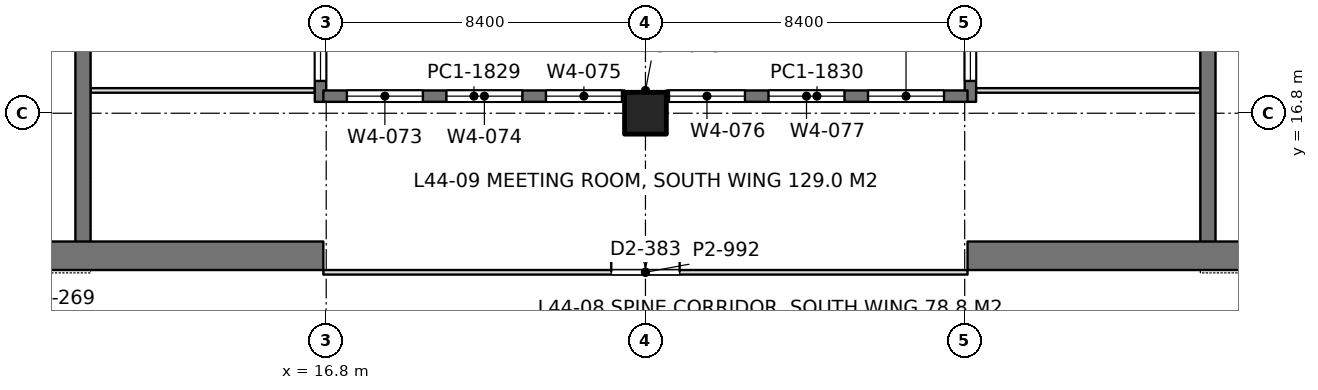
"""IFC4 building model, lengths in metres.
Left out: names, types, materials, properties, quantities, classifications, styles, units other than length and angle.
Written with IfcOpenShell. Run it as: python <this file> out.ifc"""

import sys

from ifc_helpers import new_model, si_unit, direction, frame, frame_2d, origin, origin_2d, place, context, subcontext, project, spatial, rectangle, extrude, element, fill, save


model = new_model("IFC4")
c1 = context("Model", 3, precision=1e-05, world=origin(), true_north=direction((0.0, 1.0)))
c2 = subcontext(c1, "Body", "Model", "MODEL_VIEW")
j1 = project(units=[si_unit("LENGTHUNIT", "METRE"), si_unit("PLANEANGLEUNIT", "RADIAN")], contexts=[c1])
p1 = place(None, origin())
s1 = spatial("IfcSite", under=j1, at=p1, CompositionType="ELEMENT")
p2 = place(p1, origin())
s2 = spatial("IfcBuilding", under=s1, at=p2, CompositionType="ELEMENT")
p3 = place(p2, frame((0.0, 0.0, 194.4)))
s3 = spatial("IfcBuildingStorey", under=s2, at=p3, CompositionType="ELEMENT", Elevation=194.4)
p4 = place(p3, frame((25.2, 16.8, 0.0), z_axis=(0.0, 0.0, 1.0), x_axis=(1.0, 0.0, 0.0)))
e1 = element("IfcColumn", 1, at=p4, inside=s3, PredefinedType="COLUMN", context=c2, shape_type="SweptSolid", body=[
    extrude(rectangle(XDim=1.1, YDim=1.1, at=origin_2d()), origin(), (0.0, 0.0, 1.0), 4.2),
])
p5 = place(p3, frame((-1.125, 13.05, 0.0), z_axis=(0.0, 0.0, 1.0), x_axis=(1.0, 0.0, 0.0)))
e2 = element("IfcWall", 2, at=p5, inside=s3, PredefinedType="SHEAR", context=c2, shape_type="SweptSolid", body=[
    extrude(rectangle(XDim=17.85, YDim=0.75, at=frame_2d((8.925, 0.0))), origin(), (0.0, 0.0, 1.0), 4.2),
])
p6 = place(p5, frame((8.875, 0.0, 0.0)))
e3 = element("IfcOpeningElement", 3, at=p6, cuts=e2, PredefinedType="OPENING", context=c2, shape_type="SweptSolid", body=[
    extrude(rectangle(XDim=1.8, YDim=2.4, at=frame_2d((0.9, 1.2))), frame((0.0, 0.385, 0.0), z_axis=(0.0, -1.0, 0.0), x_axis=(1.0, 0.0, 0.0)), (0.0, 0.0, 1.0), 0.77),
])
p7 = place(p3, frame((10.4, 13.05, 0.0), z_axis=(0.0, 0.0, 1.0), x_axis=(0.0, 1.0, 0.0)))
e4 = element("IfcWall", 4, at=p7, inside=s3, PredefinedType="SHEAR", context=c2, shape_type="SweptSolid", body=[
    extrude(rectangle(XDim=24.3, YDim=0.4, at=frame_2d((12.15, 0.0))), origin(), (0.0, 0.0, 1.0), 4.2),
])
p8 = place(p7, frame((15.75, 0.0, 0.0)))
e5 = element("IfcOpeningElement", 5, at=p8, cuts=e4, PredefinedType="OPENING", context=c2, shape_type="SweptSolid", body=[
    extrude(rectangle(XDim=1.1, YDim=2.2, at=frame_2d((0.55, 1.1))), frame((0.0, 0.21, 0.0), z_axis=(0.0, -1.0, 0.0), x_axis=(1.0, 0.0, 0.0)), (0.0, 0.0, 1.0), 0.42),
])
p9 = place(p7, frame((18.6, 0.0, 0.0)))
e6 = element("IfcOpeningElement", 6, at=p9, cuts=e4, PredefinedType="OPENING", context=c2, shape_type="SweptSolid", body=[
    extrude(rectangle(XDim=1.1, YDim=2.2, at=frame_2d((0.55, 1.1))), frame((0.0, 0.21, 0.0), z_axis=(0.0, -1.0, 0.0), x_axis=(1.0, 0.0, 0.0)), (0.0, 0.0, 1.0), 0.42),
])
p10 = place(p7, frame((21.45, 0.0, 0.0)))
e7 = element("IfcOpeningElement", 7, at=p10, cuts=e4, PredefinedType="OPENING", context=c2, shape_type="SweptSolid", body=[
    extrude(rectangle(XDim=1.1, YDim=2.2, at=frame_2d((0.55, 1.1))), frame((0.0, 0.21, 0.0), z_axis=(0.0, -1.0, 0.0), x_axis=(1.0, 0.0, 0.0)), (0.0, 0.0, 1.0), 0.42),
])
p11 = place(p7, frame((8.65, 0.0, 0.0)))
e8 = element("IfcOpeningElement", 8, at=p11, cuts=e4, PredefinedType="OPENING", context=c2, shape_type="SweptSolid", body=[
    extrude(rectangle(XDim=1.8, YDim=2.4, at=frame_2d((0.9, 1.2))), frame((0.0, 0.21, 0.0), z_axis=(0.0, -1.0, 0.0), x_axis=(1.0, 0.0, 0.0)), (0.0, 0.0, 1.0), 0.42),
])
p12 = place(p3, frame((33.675, 13.05, 0.0), z_axis=(0.0, 0.0, 1.0), x_axis=(1.0, 0.0, 0.0)))
e9 = element("IfcWall", 9, at=p12, inside=s3, PredefinedType="SHEAR", context=c2, shape_type="SweptSolid", body=[
    extrude(rectangle(XDim=17.85, YDim=0.75, at=frame_2d((8.925, 0.0))), origin(), (0.0, 0.0, 1.0), 4.2),
])
p13 = place(p12, frame((7.175, 0.0, 0.0)))
e10 = element("IfcOpeningElement", 10, at=p13, cuts=e9, PredefinedType="OPENING", context=c2, shape_type="SweptSolid", body=[
    extrude(rectangle(XDim=1.8, YDim=2.4, at=frame_2d((0.9, 1.2))), frame((0.0, 0.385, 0.0), z_axis=(0.0, -1.0, 0.0), x_axis=(1.0, 0.0, 0.0)), (0.0, 0.0, 1.0), 0.77),
])
p14 = place(p3, frame((40.0, 13.05, 0.0), z_axis=(0.0, 0.0, 1.0), x_axis=(0.0, 1.0, 0.0)))
e11 = element("IfcWall", 11, at=p14, inside=s3, PredefinedType="SHEAR", context=c2, shape_type="SweptSolid", body=[
    extrude(rectangle(XDim=24.3, YDim=0.4, at=frame_2d((12.15, 0.0))), origin(), (0.0, 0.0, 1.0), 4.2),
])
p15 = place(p14, frame((15.75, 0.0, 0.0)))
e12 = element("IfcOpeningElement", 12, at=p15, cuts=e11, PredefinedType="OPENING", context=c2, shape_type="SweptSolid", body=[
    extrude(rectangle(XDim=1.1, YDim=2.2, at=frame_2d((0.55, 1.1))), frame((0.0, 0.21, 0.0), z_axis=(0.0, -1.0, 0.0), x_axis=(1.0, 0.0, 0.0)), (0.0, 0.0, 1.0), 0.42),
])
p16 = place(p14, frame((18.6, 0.0, 0.0)))
e13 = element("IfcOpeningElement", 13, at=p16, cuts=e11, PredefinedType="OPENING", context=c2, shape_type="SweptSolid", body=[
    extrude(rectangle(XDim=1.1, YDim=2.2, at=frame_2d((0.55, 1.1))), frame((0.0, 0.21, 0.0), z_axis=(0.0, -1.0, 0.0), x_axis=(1.0, 0.0, 0.0)), (0.0, 0.0, 1.0), 0.42),
])
p17 = place(p14, frame((21.45, 0.0, 0.0)))
e14 = element("IfcOpeningElement", 14, at=p17, cuts=e11, PredefinedType="OPENING", context=c2, shape_type="SweptSolid", body=[
    extrude(rectangle(XDim=1.1, YDim=2.2, at=frame_2d((0.55, 1.1))), frame((0.0, 0.21, 0.0), z_axis=(0.0, -1.0, 0.0), x_axis=(1.0, 0.0, 0.0)), (0.0, 0.0, 1.0), 0.42),
])
p18 = place(p14, frame((8.65, 0.0, 0.0)))
e15 = element("IfcOpeningElement", 15, at=p18, cuts=e11, PredefinedType="OPENING", context=c2, shape_type="SweptSolid", body=[
    extrude(rectangle(XDim=1.8, YDim=2.4, at=frame_2d((0.9, 1.2))), frame((0.0, 0.21, 0.0), z_axis=(0.0, -1.0, 0.0), x_axis=(1.0, 0.0, 0.0)), (0.0, 0.0, 1.0), 0.42),
])
p19 = place(p3, frame((16.65, 17.1, 0.0), z_axis=(0.0, 0.0, 1.0), x_axis=(0.0, 1.0, 0.0)))
e16 = element("IfcWall", 16, at=p19, inside=s3, PredefinedType="SOLIDWALL", context=c2, shape_type="SweptSolid", body=[
    extrude(rectangle(XDim=10.7, YDim=0.3, at=frame_2d((5.35, 0.0))), origin(), (0.0, 0.0, 1.0), 4.05),
])
p20 = place(p19, frame((0.55, 0.0, 0.9)))
e17 = element("IfcOpeningElement", 17, at=p20, cuts=e16, PredefinedType="OPENING", context=c2, shape_type="SweptSolid", body=[
    extrude(rectangle(XDim=2.0, YDim=1.9, at=frame_2d((1.0, 0.95))), frame((0.0, 0.16, 0.0), z_axis=(0.0, -1.0, 0.0), x_axis=(1.0, 0.0, 0.0)), (0.0, 0.0, 1.0), 0.32),
])
p21 = place(p19, frame((2.9, 0.0, 0.9)))
e18 = element("IfcOpeningElement", 18, at=p21, cuts=e16, PredefinedType="OPENING", context=c2, shape_type="SweptSolid", body=[
    extrude(rectangle(XDim=2.0, YDim=1.9, at=frame_2d((1.0, 0.95))), frame((0.0, 0.16, 0.0), z_axis=(0.0, -1.0, 0.0), x_axis=(1.0, 0.0, 0.0)), (0.0, 0.0, 1.0), 0.32),
])
p22 = place(p19, frame((7.675, 0.0, 0.9)))
e19 = element("IfcOpeningElement", 19, at=p22, cuts=e16, PredefinedType="OPENING", context=c2, shape_type="SweptSolid", body=[
    extrude(rectangle(XDim=2.0, YDim=1.9, at=frame_2d((1.0, 0.95))), frame((0.0, 0.16, 0.0), z_axis=(0.0, -1.0, 0.0), x_axis=(1.0, 0.0, 0.0)), (0.0, 0.0, 1.0), 0.32),
])
p23 = place(p3, frame((33.75, 17.1, 0.0), z_axis=(0.0, 0.0, 1.0), x_axis=(0.0, 1.0, 0.0)))
e20 = element("IfcWall", 20, at=p23, inside=s3, PredefinedType="SOLIDWALL", context=c2, shape_type="SweptSolid", body=[
    extrude(rectangle(XDim=10.7, YDim=0.3, at=frame_2d((5.35, 0.0))), origin(), (0.0, 0.0, 1.0), 4.05),
])
p24 = place(p23, frame((0.55, 0.0, 0.9)))
e21 = element("IfcOpeningElement", 21, at=p24, cuts=e20, PredefinedType="OPENING", context=c2, shape_type="SweptSolid", body=[
    extrude(rectangle(XDim=2.0, YDim=1.9, at=frame_2d((1.0, 0.95))), frame((0.0, 0.16, 0.0), z_axis=(0.0, -1.0, 0.0), x_axis=(1.0, 0.0, 0.0)), (0.0, 0.0, 1.0), 0.32),
])
p25 = place(p23, frame((2.9, 0.0, 0.9)))
e22 = element("IfcOpeningElement", 22, at=p25, cuts=e20, PredefinedType="OPENING", context=c2, shape_type="SweptSolid", body=[
    extrude(rectangle(XDim=2.0, YDim=1.9, at=frame_2d((1.0, 0.95))), frame((0.0, 0.16, 0.0), z_axis=(0.0, -1.0, 0.0), x_axis=(1.0, 0.0, 0.0)), (0.0, 0.0, 1.0), 0.32),
])
p26 = place(p23, frame((7.675, 0.0, 0.9)))
e23 = element("IfcOpeningElement", 23, at=p26, cuts=e20, PredefinedType="OPENING", context=c2, shape_type="SweptSolid", body=[
    extrude(rectangle(XDim=2.0, YDim=1.9, at=frame_2d((1.0, 0.95))), frame((0.0, 0.16, 0.0), z_axis=(0.0, -1.0, 0.0), x_axis=(1.0, 0.0, 0.0)), (0.0, 0.0, 1.0), 0.32),
])
p27 = place(p3, frame((16.725, 17.25, 0.0), z_axis=(0.0, 0.0, 1.0), x_axis=(1.0, 0.0, 0.0)))
e24 = element("IfcWall", 24, at=p27, inside=s3, PredefinedType="SOLIDWALL", context=c2, shape_type="SweptSolid", body=[
    extrude(rectangle(XDim=7.925, YDim=0.3, at=frame_2d((3.962, 0.0))), origin(), (0.0, 0.0, 1.0), 4.05),
])
p28 = place(p27, frame((0.619, 0.0, 0.9)))
e25 = element("IfcOpeningElement", 25, at=p28, cuts=e24, PredefinedType="OPENING", context=c2, shape_type="SweptSolid", body=[
    extrude(rectangle(XDim=2.0, YDim=1.9, at=frame_2d((1.0, 0.95))), frame((0.0, 0.16, 0.0), z_axis=(0.0, -1.0, 0.0), x_axis=(1.0, 0.0, 0.0)), (0.0, 0.0, 1.0), 0.32),
])
p29 = place(p27, frame((3.238, 0.0, 0.9)))
e26 = element("IfcOpeningElement", 26, at=p29, cuts=e24, PredefinedType="OPENING", context=c2, shape_type="SweptSolid", body=[
    extrude(rectangle(XDim=2.0, YDim=1.9, at=frame_2d((1.0, 0.95))), frame((0.0, 0.16, 0.0), z_axis=(0.0, -1.0, 0.0), x_axis=(1.0, 0.0, 0.0)), (0.0, 0.0, 1.0), 0.32),
])
p30 = place(p27, frame((5.856, 0.0, 0.9)))
e27 = element("IfcOpeningElement", 27, at=p30, cuts=e24, PredefinedType="OPENING", context=c2, shape_type="SweptSolid", body=[
    extrude(rectangle(XDim=2.0, YDim=1.9, at=frame_2d((1.0, 0.95))), frame((0.0, 0.16, 0.0), z_axis=(0.0, -1.0, 0.0), x_axis=(1.0, 0.0, 0.0)), (0.0, 0.0, 1.0), 0.32),
])
p31 = place(p3, frame((25.75, 17.25, 0.0), z_axis=(0.0, 0.0, 1.0), x_axis=(1.0, 0.0, 0.0)))
e28 = element("IfcWall", 28, at=p31, inside=s3, PredefinedType="SOLIDWALL", context=c2, shape_type="SweptSolid", body=[
    extrude(rectangle(XDim=7.925, YDim=0.3, at=frame_2d((3.962, 0.0))), origin(), (0.0, 0.0, 1.0), 4.05),
])
p32 = place(p31, frame((0.069, 0.0, 0.9)))
e29 = element("IfcOpeningElement", 29, at=p32, cuts=e28, PredefinedType="OPENING", context=c2, shape_type="SweptSolid", body=[
    extrude(rectangle(XDim=2.0, YDim=1.9, at=frame_2d((1.0, 0.95))), frame((0.0, 0.16, 0.0), z_axis=(0.0, -1.0, 0.0), x_axis=(1.0, 0.0, 0.0)), (0.0, 0.0, 1.0), 0.32),
])
p33 = place(p31, frame((2.688, 0.0, 0.9)))
e30 = element("IfcOpeningElement", 30, at=p33, cuts=e28, PredefinedType="OPENING", context=c2, shape_type="SweptSolid", body=[
    extrude(rectangle(XDim=2.0, YDim=1.9, at=frame_2d((1.0, 0.95))), frame((0.0, 0.16, 0.0), z_axis=(0.0, -1.0, 0.0), x_axis=(1.0, 0.0, 0.0)), (0.0, 0.0, 1.0), 0.32),
])
p34 = place(p31, frame((5.306, 0.0, 0.9)))
e31 = element("IfcOpeningElement", 31, at=p34, cuts=e28, PredefinedType="OPENING", context=c2, shape_type="SweptSolid", body=[
    extrude(rectangle(XDim=2.0, YDim=1.9, at=frame_2d((1.0, 0.95))), frame((0.0, 0.16, 0.0), z_axis=(0.0, -1.0, 0.0), x_axis=(1.0, 0.0, 0.0)), (0.0, 0.0, 1.0), 0.32),
])
for number, where, z_axis, x_axis in (
    (32, (10.598, 17.4, 0.0), (0.0, 0.0, 1.0), (1.0, 0.0, 0.0)),
    (33, (33.898, 17.4, 0.0), (0.0, 0.0, 1.0), (1.0, 0.0, 0.0)),
):
    element("IfcWall", number, at=place(p3, frame(where, z_axis=z_axis, x_axis=x_axis)), inside=s3, PredefinedType="PARTITIONING", context=c2, shape_type="SweptSolid", body=[
        extrude(rectangle(XDim=5.904, YDim=0.12, at=frame_2d((2.952, 0.0))), origin(), (0.0, 0.0, 1.0), 3.55),
    ])
p35 = place(p3, frame((16.725, 12.615, 0.0), z_axis=(0.0, 0.0, 1.0), x_axis=(1.0, 0.0, 0.0)))
e34 = element("IfcWall", 34, at=p35, inside=s3, PredefinedType="PARTITIONING", context=c2, shape_type="SweptSolid", body=[
    extrude(rectangle(XDim=16.95, YDim=0.12, at=frame_2d((8.475, 0.0))), origin(), (0.0, 0.0, 1.0), 3.55),
])
p36 = place(p35, frame((7.575, 0.0, 0.0)))
e35 = element("IfcOpeningElement", 35, at=p36, cuts=e34, PredefinedType="OPENING", context=c2, shape_type="SweptSolid", body=[
    extrude(rectangle(XDim=1.8, YDim=2.2, at=frame_2d((0.9, 1.1))), frame((0.0, 0.07, 0.0), z_axis=(0.0, -1.0, 0.0), x_axis=(1.0, 0.0, 0.0)), (0.0, 0.0, 1.0), 0.14),
])
p37 = place(p20, origin())
e36 = element("IfcWindow", 36, at=p37, inside=s3, PartitioningType="SINGLE_PANEL", PredefinedType="WINDOW", context=c2, shape_type="SweptSolid", body=[
    extrude(rectangle(XDim=2.0, YDim=1.9, at=frame_2d((1.0, 0.95))), frame((0.0, 0.03, 0.0), z_axis=(0.0, -1.0, 0.0), x_axis=(1.0, 0.0, 0.0)), (0.0, 0.0, 1.0), 0.06),
])
fill(e17, e36)
p38 = place(p24, origin())
e37 = element("IfcWindow", 37, at=p38, inside=s3, PartitioningType="SINGLE_PANEL", PredefinedType="WINDOW", context=c2, shape_type="SweptSolid", body=[
    extrude(rectangle(XDim=2.0, YDim=1.9, at=frame_2d((1.0, 0.95))), frame((0.0, 0.03, 0.0), z_axis=(0.0, -1.0, 0.0), x_axis=(1.0, 0.0, 0.0)), (0.0, 0.0, 1.0), 0.06),
])
fill(e21, e37)
p39 = place(p28, origin())
e38 = element("IfcWindow", 38, at=p39, inside=s3, PartitioningType="SINGLE_PANEL", PredefinedType="WINDOW", context=c2, shape_type="SweptSolid", body=[
    extrude(rectangle(XDim=2.0, YDim=1.9, at=frame_2d((1.0, 0.95))), frame((0.0, 0.03, 0.0), z_axis=(0.0, -1.0, 0.0), x_axis=(1.0, 0.0, 0.0)), (0.0, 0.0, 1.0), 0.06),
])
fill(e25, e38)
p40 = place(p29, origin())
e39 = element("IfcWindow", 39, at=p40, inside=s3, PartitioningType="SINGLE_PANEL", PredefinedType="WINDOW", context=c2, shape_type="SweptSolid", body=[
    extrude(rectangle(XDim=2.0, YDim=1.9, at=frame_2d((1.0, 0.95))), frame((0.0, 0.03, 0.0), z_axis=(0.0, -1.0, 0.0), x_axis=(1.0, 0.0, 0.0)), (0.0, 0.0, 1.0), 0.06),
])
fill(e26, e39)
p41 = place(p30, origin())
e40 = element("IfcWindow", 40, at=p41, inside=s3, PartitioningType="SINGLE_PANEL", PredefinedType="WINDOW", context=c2, shape_type="SweptSolid", body=[
    extrude(rectangle(XDim=2.0, YDim=1.9, at=frame_2d((1.0, 0.95))), frame((0.0, 0.03, 0.0), z_axis=(0.0, -1.0, 0.0), x_axis=(1.0, 0.0, 0.0)), (0.0, 0.0, 1.0), 0.06),
])
fill(e27, e40)
p42 = place(p32, origin())
e41 = element("IfcWindow", 41, at=p42, inside=s3, PartitioningType="SINGLE_PANEL", PredefinedType="WINDOW", context=c2, shape_type="SweptSolid", body=[
    extrude(rectangle(XDim=2.0, YDim=1.9, at=frame_2d((1.0, 0.95))), frame((0.0, 0.03, 0.0), z_axis=(0.0, -1.0, 0.0), x_axis=(1.0, 0.0, 0.0)), (0.0, 0.0, 1.0), 0.06),
])
fill(e29, e41)
p43 = place(p33, origin())
e42 = element("IfcWindow", 42, at=p43, inside=s3, PartitioningType="SINGLE_PANEL", PredefinedType="WINDOW", context=c2, shape_type="SweptSolid", body=[
    extrude(rectangle(XDim=2.0, YDim=1.9, at=frame_2d((1.0, 0.95))), frame((0.0, 0.03, 0.0), z_axis=(0.0, -1.0, 0.0), x_axis=(1.0, 0.0, 0.0)), (0.0, 0.0, 1.0), 0.06),
])
fill(e30, e42)
p44 = place(p34, origin())
e43 = element("IfcWindow", 43, at=p44, inside=s3, PartitioningType="SINGLE_PANEL", PredefinedType="WINDOW", context=c2, shape_type="SweptSolid", body=[
    extrude(rectangle(XDim=2.0, YDim=1.9, at=frame_2d((1.0, 0.95))), frame((0.0, 0.03, 0.0), z_axis=(0.0, -1.0, 0.0), x_axis=(1.0, 0.0, 0.0)), (0.0, 0.0, 1.0), 0.06),
])
fill(e31, e43)
p45 = place(p36, origin())
e44 = element("IfcDoor", 44, at=p45, inside=s3, OperationType="DOUBLE_DOOR_SINGLE_SWING", PredefinedType="DOOR", context=c2, shape_type="SweptSolid", body=[
    extrude(rectangle(XDim=1.8, YDim=2.2, at=frame_2d((0.9, 1.1))), frame((0.0, 0.025, 0.0), z_axis=(0.0, -1.0, 0.0), x_axis=(1.0, 0.0, 0.0)), (0.0, 0.0, 1.0), 0.05),
])
fill(e35, e44)
save(model, sys.argv[1])
